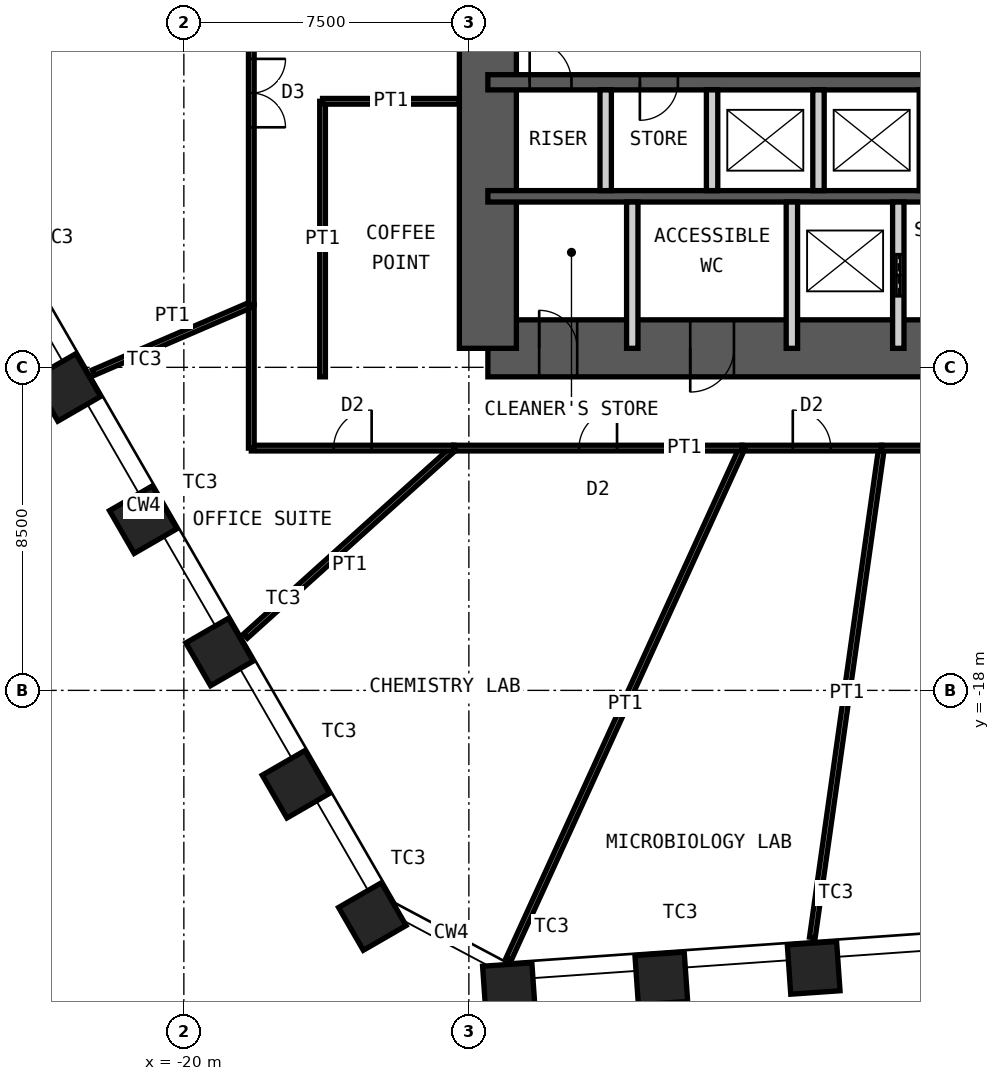
"""IFC4 building model, lengths in metres.
Left out: names, types, materials, properties, quantities, classifications, styles, units other than length and angle.
Written with IfcOpenShell. Run it as: python <this file> out.ifc"""

import sys

from ifc_helpers import new_model, si_unit, direction, frame, frame_2d, origin, origin_2d, place, context, subcontext, project, spatial, rectangle, hollow_rectangle, extrude, element, fill, save


model = new_model("IFC4")
c1 = context("Model", 3, precision=1e-05, world=origin(), true_north=direction((0.0, 1.0)))
c2 = subcontext(c1, "Body", "Model", "MODEL_VIEW")
j1 = project(units=[si_unit("LENGTHUNIT", "METRE"), si_unit("PLANEANGLEUNIT", "RADIAN")], contexts=[c1])
p1 = place(None, origin())
s1 = spatial("IfcSite", under=j1, at=p1, CompositionType="ELEMENT")
p2 = place(p1, origin())
s2 = spatial("IfcBuilding", under=s1, at=p2, CompositionType="ELEMENT")
p3 = place(p2, frame((0.0, 0.0, 124.0)))
s3 = spatial("IfcBuildingStorey", under=s2, at=p3, CompositionType="ELEMENT", Elevation=124.0)
for number, where, z_axis, x_axis in (
    (1, (-3.427, -25.301, 0.0), (0.0, 0.0, 1.0), (0.998, 0.07, 0.0)),
    (2, (-7.436, -25.581, 0.0), (0.0, 0.0, 1.0), (0.998, 0.07, 0.0)),
    (3, (-11.446, -25.861, 0.0), (0.0, 0.0, 1.0), (0.998, 0.07, 0.0)),
    (4, (-15.04, -23.95, 0.0), (0.0, 0.0, 1.0), (0.5, -0.866, 0.0)),
    (5, (-17.049, -20.47, 0.0), (0.0, 0.0, 1.0), (0.5, -0.866, 0.0)),
    (6, (-19.059, -16.989, 0.0), (0.0, 0.0, 1.0), (0.5, -0.866, 0.0)),
    (7, (-21.068, -13.509, 0.0), (0.0, 0.0, 1.0), (0.5, -0.866, 0.0)),
    (8, (-23.078, -10.028, 0.0), (0.0, 0.0, 1.0), (0.5, -0.866, 0.0)),
):
    element("IfcColumn", number, at=place(p3, frame(where, z_axis=z_axis, x_axis=x_axis)), inside=s3, PredefinedType="COLUMN", context=c2, shape_type="SweptSolid", body=[
        extrude(hollow_rectangle(XDim=1.3, YDim=1.3, WallThickness=0.1, at=origin_2d()), origin(), (0.0, 0.0, 1.0), 4.2),
    ])
p4 = place(p3, frame((-12.0, -9.0, 0.0), z_axis=(0.0, 0.0, 1.0), x_axis=(1.0, 0.0, 0.0)))
e9 = element("IfcWall", 9, at=p4, inside=s3, PredefinedType="SHEAR", context=c2, shape_type="SweptSolid", body=[
    extrude(rectangle(XDim=24.0, YDim=1.5, at=frame_2d((12.0, 0.0))), origin(), (0.0, 0.0, 1.0), 4.2),
])
p5 = place(p4, frame((1.35, 0.0, 0.0)))
e10 = element("IfcOpeningElement", 10, at=p5, cuts=e9, PredefinedType="OPENING", context=c2, shape_type="SweptSolid", body=[
    extrude(rectangle(XDim=1.0, YDim=2.1, at=frame_2d((0.5, 1.05))), frame((0.0, 0.76, 0.0), z_axis=(0.0, -1.0, 0.0), x_axis=(1.0, 0.0, 0.0)), (0.0, 0.0, 1.0), 1.52),
])
p6 = place(p4, frame((5.325, 0.0, 0.0)))
e11 = element("IfcOpeningElement", 11, at=p6, cuts=e9, PredefinedType="OPENING", context=c2, shape_type="SweptSolid", body=[
    extrude(rectangle(XDim=1.15, YDim=2.1, at=frame_2d((0.575, 1.05))), frame((0.0, 0.76, 0.0), z_axis=(0.0, -1.0, 0.0), x_axis=(1.0, 0.0, 0.0)), (0.0, 0.0, 1.0), 1.52),
])
p7 = place(p4, frame((12.6, 0.0, 0.0)))
e12 = element("IfcOpeningElement", 12, at=p7, cuts=e9, PredefinedType="OPENING", context=c2, shape_type="SweptSolid", body=[
    extrude(rectangle(XDim=1.0, YDim=2.1, at=frame_2d((0.5, 1.05))), frame((0.0, 0.76, 0.0), z_axis=(0.0, -1.0, 0.0), x_axis=(1.0, 0.0, 0.0)), (0.0, 0.0, 1.0), 1.52),
])
p8 = place(p3, frame((-12.0, -9.0, 0.0), z_axis=(0.0, 0.0, 1.0), x_axis=(0.0, 1.0, 0.0)))
e13 = element("IfcWall", 13, at=p8, inside=s3, PredefinedType="SHEAR", context=c2, shape_type="SweptSolid", body=[
    extrude(rectangle(XDim=18.0, YDim=1.5, at=frame_2d((9.0, 0.0))), origin(), (0.0, 0.0, 1.0), 4.2),
])
p9 = place(p8, frame((8.1, 0.0, 0.0)))
e14 = element("IfcOpeningElement", 14, at=p9, cuts=e13, PredefinedType="OPENING", context=c2, shape_type="SweptSolid", body=[
    extrude(rectangle(XDim=1.8, YDim=2.1, at=frame_2d((0.9, 1.05))), frame((0.0, 0.76, 0.0), z_axis=(0.0, -1.0, 0.0), x_axis=(1.0, 0.0, 0.0)), (0.0, 0.0, 1.0), 1.52),
])
p10 = place(p3, frame((-12.0, -2.0, 0.0), z_axis=(0.0, 0.0, 1.0), x_axis=(1.0, 0.0, 0.0)))
e15 = element("IfcWall", 15, at=p10, inside=s3, PredefinedType="SHEAR", context=c2, shape_type="SweptSolid", body=[
    extrude(rectangle(XDim=24.0, YDim=0.4, at=frame_2d((12.0, 0.0))), origin(), (0.0, 0.0, 1.0), 4.2),
])
p11 = place(p10, frame((1.1, 0.0, 0.0)))
e16 = element("IfcOpeningElement", 16, at=p11, cuts=e15, PredefinedType="OPENING", context=c2, shape_type="SweptSolid", body=[
    extrude(rectangle(XDim=1.1, YDim=2.1, at=frame_2d((0.55, 1.05))), frame((0.0, 0.21, 0.0), z_axis=(0.0, -1.0, 0.0), x_axis=(1.0, 0.0, 0.0)), (0.0, 0.0, 1.0), 0.42),
])
p12 = place(p10, frame((13.55, 0.0, 0.0)))
e17 = element("IfcOpeningElement", 17, at=p12, cuts=e15, PredefinedType="OPENING", context=c2, shape_type="SweptSolid", body=[
    extrude(rectangle(XDim=1.1, YDim=2.1, at=frame_2d((0.55, 1.05))), frame((0.0, 0.21, 0.0), z_axis=(0.0, -1.0, 0.0), x_axis=(1.0, 0.0, 0.0)), (0.0, 0.0, 1.0), 0.42),
])
p13 = place(p10, frame((20.7, 0.0, 0.0)))
e18 = element("IfcOpeningElement", 18, at=p13, cuts=e15, PredefinedType="OPENING", context=c2, shape_type="SweptSolid", body=[
    extrude(rectangle(XDim=1.1, YDim=2.1, at=frame_2d((0.55, 1.05))), frame((0.0, 0.21, 0.0), z_axis=(0.0, -1.0, 0.0), x_axis=(1.0, 0.0, 0.0)), (0.0, 0.0, 1.0), 0.42),
])
p14 = place(p10, frame((4.0, 0.0, 0.0)))
e19 = element("IfcOpeningElement", 19, at=p14, cuts=e15, PredefinedType="OPENING", context=c2, shape_type="SweptSolid", body=[
    extrude(rectangle(XDim=1.0, YDim=2.1, at=frame_2d((0.5, 1.05))), frame((0.0, 0.21, 0.0), z_axis=(0.0, -1.0, 0.0), x_axis=(1.0, 0.0, 0.0)), (0.0, 0.0, 1.0), 0.42),
])
p15 = place(p3, frame((-12.0, -5.0, 0.0), z_axis=(0.0, 0.0, 1.0), x_axis=(1.0, 0.0, 0.0)))
e20 = element("IfcWall", 20, at=p15, inside=s3, PredefinedType="SHEAR", context=c2, shape_type="SweptSolid", body=[
    extrude(rectangle(XDim=24.0, YDim=0.3, at=frame_2d((12.0, 0.0))), origin(), (0.0, 0.0, 1.0), 4.2),
])
for number, where, z_axis, x_axis in (
    (21, (-8.9, -4.85, 0.0), (0.0, 0.0, 1.0), (0.0, 1.0, 0.0)),
    (22, (-6.1, -4.85, 0.0), (0.0, 0.0, 1.0), (0.0, 1.0, 0.0)),
    (23, (-3.3, -4.85, 0.0), (0.0, 0.0, 1.0), (0.0, 1.0, 0.0)),
    (24, (-0.5, -4.85, 0.0), (0.0, 0.0, 1.0), (0.0, 1.0, 0.0)),
):
    element("IfcWall", number, at=place(p3, frame(where, z_axis=z_axis, x_axis=x_axis)), inside=s3, PredefinedType="PARTITIONING", context=c2, shape_type="SweptSolid", body=[
        extrude(rectangle(XDim=2.65, YDim=0.3, at=frame_2d((1.325, 0.0))), origin(), (0.0, 0.0, 1.0), 3.98),
    ])
for number, where, z_axis, x_axis in (
    (25, (-8.2, -9.0, 0.0), (0.0, 0.0, 1.0), (0.0, 1.0, 0.0)),
    (26, (-4.0, -9.0, 0.0), (0.0, 0.0, 1.0), (0.0, 1.0, 0.0)),
):
    element("IfcWall", number, at=place(p3, frame(where, z_axis=z_axis, x_axis=x_axis)), inside=s3, PredefinedType="PARTITIONING", context=c2, shape_type="SweptSolid", body=[
        extrude(rectangle(XDim=3.85, YDim=0.3, at=frame_2d((1.925, 0.0))), origin(), (0.0, 0.0, 1.0), 3.98),
    ])
p16 = place(p3, frame((-1.2, -9.0, 0.0), z_axis=(0.0, 0.0, 1.0), x_axis=(0.0, 1.0, 0.0)))
e27 = element("IfcWall", 27, at=p16, inside=s3, PredefinedType="PARTITIONING", context=c2, shape_type="SweptSolid", body=[
    extrude(rectangle(XDim=3.85, YDim=0.3, at=frame_2d((1.925, 0.0))), origin(), (0.0, 0.0, 1.0), 3.98),
])
p17 = place(p16, frame((1.375, 0.0, 0.0)))
e28 = element("IfcOpeningElement", 28, at=p17, cuts=e27, PredefinedType="OPENING", context=c2, shape_type="SweptSolid", body=[
    extrude(rectangle(XDim=1.1, YDim=2.4, at=frame_2d((0.55, 1.2))), frame((0.0, 0.16, 0.0), z_axis=(0.0, -1.0, 0.0), x_axis=(1.0, 0.0, 0.0)), (0.0, 0.0, 1.0), 0.32),
])
p18 = place(p3, frame((-3.462, -24.503, 0.0), z_axis=(0.0, 0.0, 1.0), x_axis=(0.139899618934, 0.990165691499, 0.0)))
e29 = element("IfcWall", 29, at=p18, inside=s3, PredefinedType="PARTITIONING", context=c2, shape_type="SweptSolid", body=[
    extrude(rectangle(XDim=13.006, YDim=0.15, at=frame_2d((6.503, 0.0))), origin(), (0.0, 0.0, 1.0), 3.33),
])
p19 = place(p3, frame((-1.642, -11.625, 0.0), z_axis=(0.0, 0.0, 1.0), x_axis=(-1.0, 0.0, 0.0)))
e30 = element("IfcWall", 30, at=p19, inside=s3, PredefinedType="PARTITIONING", context=c2, shape_type="SweptSolid", body=[
    extrude(rectangle(XDim=3.668, YDim=0.15, at=frame_2d((1.834, 0.0))), origin(), (0.0, 0.0, 1.0), 4.03),
])
p20 = place(p19, frame((1.334, 0.0, 0.0)))
e31 = element("IfcOpeningElement", 31, at=p20, cuts=e30, PredefinedType="OPENING", context=c2, shape_type="SweptSolid", body=[
    extrude(rectangle(XDim=1.0, YDim=2.4, at=frame_2d((0.5, 1.2))), frame((0.0, 0.085, 0.0), z_axis=(0.0, -1.0, 0.0), x_axis=(1.0, 0.0, 0.0)), (0.0, 0.0, 1.0), 0.17),
])
p21 = place(p3, frame((-11.453, -25.072, 0.0), z_axis=(0.0, 0.0, 1.0), x_axis=(0.415494357555, 0.909595755729, 0.0)))
e32 = element("IfcWall", 32, at=p21, inside=s3, PredefinedType="PARTITIONING", context=c2, shape_type="SweptSolid", body=[
    extrude(rectangle(XDim=14.784, YDim=0.15, at=frame_2d((7.392, 0.0))), origin(), (0.0, 0.0, 1.0), 2.93),
])
p22 = place(p3, frame((-5.31, -11.625, 0.0), z_axis=(0.0, 0.0, 1.0), x_axis=(-1.0, 0.0, 0.0)))
e33 = element("IfcWall", 33, at=p22, inside=s3, PredefinedType="PARTITIONING", context=c2, shape_type="SweptSolid", body=[
    extrude(rectangle(XDim=7.582, YDim=0.15, at=frame_2d((3.791, 0.0))), origin(), (0.0, 0.0, 1.0), 4.03),
])
p23 = place(p22, frame((3.291, 0.0, 0.0)))
e34 = element("IfcOpeningElement", 34, at=p23, cuts=e33, PredefinedType="OPENING", context=c2, shape_type="SweptSolid", body=[
    extrude(rectangle(XDim=1.0, YDim=2.4, at=frame_2d((0.5, 1.2))), frame((0.0, 0.085, 0.0), z_axis=(0.0, -1.0, 0.0), x_axis=(1.0, 0.0, 0.0)), (0.0, 0.0, 1.0), 0.17),
])
p24 = place(p3, frame((-18.378, -16.572, 0.0), z_axis=(0.0, 0.0, 1.0), x_axis=(0.742666079924, 0.669661924951, 0.0)))
e35 = element("IfcWall", 35, at=p24, inside=s3, PredefinedType="PARTITIONING", context=c2, shape_type="SweptSolid", body=[
    extrude(rectangle(XDim=7.387, YDim=0.15, at=frame_2d((3.694, 0.0))), origin(), (0.0, 0.0, 1.0), 3.33),
])
p25 = place(p3, frame((-12.892, -11.625, 0.0), z_axis=(0.0, 0.0, 1.0), x_axis=(-1.0, 0.0, 0.0)))
e36 = element("IfcWall", 36, at=p25, inside=s3, PredefinedType="PARTITIONING", context=c2, shape_type="SweptSolid", body=[
    extrude(rectangle(XDim=5.333, YDim=0.15, at=frame_2d((2.667, 0.0))), origin(), (0.0, 0.0, 1.0), 4.03),
])
p26 = place(p25, frame((2.167, 0.0, 0.0)))
e37 = element("IfcOpeningElement", 37, at=p26, cuts=e36, PredefinedType="OPENING", context=c2, shape_type="SweptSolid", body=[
    extrude(rectangle(XDim=1.0, YDim=2.4, at=frame_2d((0.5, 1.2))), frame((0.0, 0.085, 0.0), z_axis=(0.0, -1.0, 0.0), x_axis=(1.0, 0.0, 0.0)), (0.0, 0.0, 1.0), 0.17),
])
p27 = place(p3, frame((-18.225, -11.625, 0.0), z_axis=(0.0, 0.0, 1.0), x_axis=(0.0, 1.0, 0.0)))
e38 = element("IfcWall", 38, at=p27, inside=s3, PredefinedType="PARTITIONING", context=c2, shape_type="SweptSolid", body=[
    extrude(rectangle(XDim=3.776, YDim=0.15, at=frame_2d((1.888, 0.0))), origin(), (0.0, 0.0, 1.0), 4.03),
])
p28 = place(p3, frame((-22.38, -9.638, 0.0), z_axis=(0.0, 0.0, 1.0), x_axis=(0.918428905659, 0.395586078181, 0.0)))
e39 = element("IfcWall", 39, at=p28, inside=s3, PredefinedType="PARTITIONING", context=c2, shape_type="SweptSolid", body=[
    extrude(rectangle(XDim=4.524, YDim=0.15, at=frame_2d((2.262, 0.0))), origin(), (0.0, 0.0, 1.0), 3.33),
])
p29 = place(p3, frame((-18.225, -7.849, 0.0), z_axis=(0.0, 0.0, 1.0), x_axis=(0.0, 1.0, 0.0)))
e40 = element("IfcWall", 40, at=p29, inside=s3, PredefinedType="PARTITIONING", context=c2, shape_type="SweptSolid", body=[
    extrude(rectangle(XDim=11.13, YDim=0.15, at=frame_2d((5.565, 0.0))), origin(), (0.0, 0.0, 1.0), 4.03),
])
p30 = place(p29, frame((4.665, 0.0, 0.0)))
e41 = element("IfcOpeningElement", 41, at=p30, cuts=e40, PredefinedType="OPENING", context=c2, shape_type="SweptSolid", body=[
    extrude(rectangle(XDim=1.8, YDim=2.4, at=frame_2d((0.9, 1.2))), frame((0.0, 0.085, 0.0), z_axis=(0.0, -1.0, 0.0), x_axis=(1.0, 0.0, 0.0)), (0.0, 0.0, 1.0), 0.17),
])
p31 = place(p3, frame((4.184, -11.625, 0.0), z_axis=(0.0, 0.0, 1.0), x_axis=(-1.0, 0.0, 0.0)))
e42 = element("IfcWall", 42, at=p31, inside=s3, PredefinedType="PARTITIONING", context=c2, shape_type="SweptSolid", body=[
    extrude(rectangle(XDim=5.826, YDim=0.15, at=frame_2d((2.913, 0.0))), origin(), (0.0, 0.0, 1.0), 4.03),
])
p32 = place(p31, frame((2.013, 0.0, 0.0)))
e43 = element("IfcOpeningElement", 43, at=p32, cuts=e42, PredefinedType="OPENING", context=c2, shape_type="SweptSolid", body=[
    extrude(rectangle(XDim=1.8, YDim=2.4, at=frame_2d((0.9, 1.2))), frame((0.0, 0.085, 0.0), z_axis=(0.0, -1.0, 0.0), x_axis=(1.0, 0.0, 0.0)), (0.0, 0.0, 1.0), 0.17),
])
p33 = place(p3, frame((-16.35, -9.75, 0.0), z_axis=(0.0, 0.0, 1.0), x_axis=(0.0, 1.0, 0.0)))
e44 = element("IfcWall", 44, at=p33, inside=s3, PredefinedType="PARTITIONING", context=c2, shape_type="SweptSolid", body=[
    extrude(rectangle(XDim=7.25, YDim=0.15, at=frame_2d((3.625, 0.0))), origin(), (0.0, 0.0, 1.0), 4.03),
])
p34 = place(p3, frame((-12.75, -2.5, 0.0), z_axis=(0.0, 0.0, 1.0), x_axis=(-1.0, 0.0, 0.0)))
e45 = element("IfcWall", 45, at=p34, inside=s3, PredefinedType="PARTITIONING", context=c2, shape_type="SweptSolid", body=[
    extrude(rectangle(XDim=3.6, YDim=0.15, at=frame_2d((1.8, 0.0))), origin(), (0.0, 0.0, 1.0), 3.33),
])
p35 = place(p5, origin())
e46 = element("IfcDoor", 46, at=p35, inside=s3, OperationType="SINGLE_SWING_RIGHT", PredefinedType="DOOR", context=c2, shape_type="SweptSolid", body=[
    extrude(rectangle(XDim=1.0, YDim=2.1, at=frame_2d((0.5, 1.05))), frame((0.0, 0.025, 0.0), z_axis=(0.0, -1.0, 0.0), x_axis=(1.0, 0.0, 0.0)), (0.0, 0.0, 1.0), 0.05),
])
fill(e10, e46)
p36 = place(p6, origin())
e47 = element("IfcDoor", 47, at=p36, inside=s3, OperationType="SINGLE_SWING_LEFT", PredefinedType="DOOR", context=c2, shape_type="SweptSolid", body=[
    extrude(rectangle(XDim=1.15, YDim=2.1, at=frame_2d((0.575, 1.05))), frame((0.0, 0.025, 0.0), z_axis=(0.0, -1.0, 0.0), x_axis=(1.0, 0.0, 0.0)), (0.0, 0.0, 1.0), 0.05),
])
fill(e11, e47)
p37 = place(p11, origin())
e48 = element("IfcDoor", 48, at=p37, inside=s3, OperationType="SINGLE_SWING_RIGHT", PredefinedType="DOOR", context=c2, shape_type="SweptSolid", body=[
    extrude(rectangle(XDim=1.1, YDim=2.1, at=frame_2d((0.55, 1.05))), frame((0.0, 0.025, 0.0), z_axis=(0.0, -1.0, 0.0), x_axis=(1.0, 0.0, 0.0)), (0.0, 0.0, 1.0), 0.05),
])
fill(e16, e48)
p38 = place(p17, origin())
e49 = element("IfcDoor", 49, at=p38, inside=s3, OperationType="DOUBLE_DOOR_SLIDING", PredefinedType="DOOR", context=c2, shape_type="SweptSolid", body=[
    extrude(rectangle(XDim=1.1, YDim=2.4, at=frame_2d((0.55, 1.2))), frame((0.0, 0.025, 0.0), z_axis=(0.0, -1.0, 0.0), x_axis=(1.0, 0.0, 0.0)), (0.0, 0.0, 1.0), 0.05),
])
fill(e28, e49)
p39 = place(p14, origin())
e50 = element("IfcDoor", 50, at=p39, inside=s3, OperationType="SINGLE_SWING_LEFT", PredefinedType="DOOR", context=c2, shape_type="SweptSolid", body=[
    extrude(rectangle(XDim=1.0, YDim=2.1, at=frame_2d((0.5, 1.05))), frame((0.0, 0.025, 0.0), z_axis=(0.0, -1.0, 0.0), x_axis=(1.0, 0.0, 0.0)), (0.0, 0.0, 1.0), 0.05),
])
fill(e19, e50)
p40 = place(p20, origin())
e51 = element("IfcDoor", 51, at=p40, inside=s3, OperationType="SINGLE_SWING_RIGHT", PredefinedType="DOOR", context=c2, shape_type="SweptSolid", body=[
    extrude(rectangle(XDim=1.0, YDim=2.4, at=frame_2d((0.5, 1.2))), frame((0.0, 0.025, 0.0), z_axis=(0.0, -1.0, 0.0), x_axis=(1.0, 0.0, 0.0)), (0.0, 0.0, 1.0), 0.05),
])
fill(e31, e51)
p41 = place(p23, origin())
e52 = element("IfcDoor", 52, at=p41, inside=s3, OperationType="SINGLE_SWING_LEFT", PredefinedType="DOOR", context=c2, shape_type="SweptSolid", body=[
    extrude(rectangle(XDim=1.0, YDim=2.4, at=frame_2d((0.5, 1.2))), frame((0.0, 0.025, 0.0), z_axis=(0.0, -1.0, 0.0), x_axis=(1.0, 0.0, 0.0)), (0.0, 0.0, 1.0), 0.05),
])
fill(e34, e52)
p42 = place(p26, origin())
e53 = element("IfcDoor", 53, at=p42, inside=s3, OperationType="SINGLE_SWING_LEFT", PredefinedType="DOOR", context=c2, shape_type="SweptSolid", body=[
    extrude(rectangle(XDim=1.0, YDim=2.4, at=frame_2d((0.5, 1.2))), frame((0.0, 0.025, 0.0), z_axis=(0.0, -1.0, 0.0), x_axis=(1.0, 0.0, 0.0)), (0.0, 0.0, 1.0), 0.05),
])
fill(e37, e53)
p43 = place(p30, origin())
e54 = element("IfcDoor", 54, at=p43, inside=s3, OperationType="DOUBLE_DOOR_DOUBLE_SWING", PredefinedType="DOOR", context=c2, shape_type="SweptSolid", body=[
    extrude(rectangle(XDim=1.8, YDim=2.4, at=frame_2d((0.9, 1.2))), frame((0.0, 0.025, 0.0), z_axis=(0.0, -1.0, 0.0), x_axis=(1.0, 0.0, 0.0)), (0.0, 0.0, 1.0), 0.05),
])
fill(e41, e54)
save(model, sys.argv[1])
